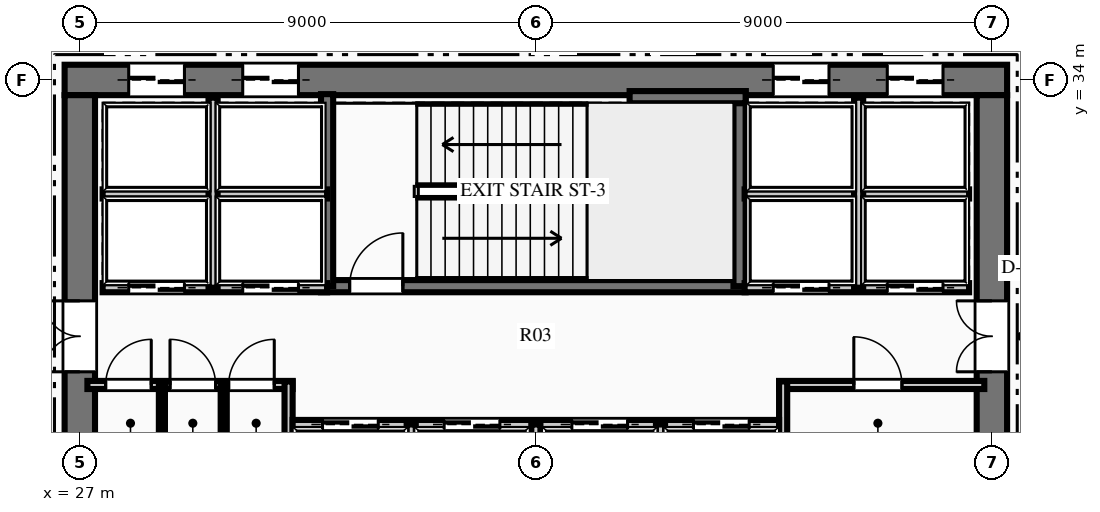
"""IFC4 building model, lengths in metres.
Left out: names, types, materials, properties, quantities, classifications, styles, units other than length and angle.
Written with IfcOpenShell. Run it as: python <this file> out.ifc"""

import sys

from ifc_helpers import new_model, si_unit, direction, frame, frame_2d, origin, place, context, subcontext, project, spatial, rectangle, extrude, element, fill, save


model = new_model("IFC4")
c1 = context("Model", 3, precision=1e-05, world=origin(), true_north=direction((0.0, 1.0)))
c2 = subcontext(c1, "Body", "Model", "MODEL_VIEW")
j1 = project(units=[si_unit("LENGTHUNIT", "METRE"), si_unit("PLANEANGLEUNIT", "RADIAN")], contexts=[c1])
p1 = place(None, origin())
s1 = spatial("IfcSite", under=j1, at=p1, CompositionType="ELEMENT")
p2 = place(p1, origin())
s2 = spatial("IfcBuilding", under=s1, at=p2, CompositionType="ELEMENT")
p3 = place(p2, frame((0.0, 0.0, 28.2)))
s3 = spatial("IfcBuildingStorey", under=s2, at=p3, CompositionType="ELEMENT", Elevation=28.2)
p4 = place(p3, frame((26.7, 34.0, 0.0), z_axis=(0.0, 0.0, 1.0), x_axis=(1.0, 0.0, 0.0)))
e1 = element("IfcWall", 1, at=p4, inside=s3, PredefinedType="SHEAR", context=c2, shape_type="SweptSolid", body=[
    extrude(rectangle(XDim=18.6, YDim=0.6, at=frame_2d((9.3, 0.0))), origin(), (0.0, 0.0, 1.0), 4.5),
])
p5 = place(p4, frame((1.265, 0.0, 0.0)))
e2 = element("IfcOpeningElement", 2, at=p5, cuts=e1, PredefinedType="OPENING", context=c2, shape_type="SweptSolid", body=[
    extrude(rectangle(XDim=1.1, YDim=2.15, at=frame_2d((0.55, 1.075))), frame((0.0, 0.31, 0.0), z_axis=(0.0, -1.0, 0.0), x_axis=(1.0, 0.0, 0.0)), (0.0, 0.0, 1.0), 0.62),
])
p6 = place(p4, frame((3.515, 0.0, 0.0)))
e3 = element("IfcOpeningElement", 3, at=p6, cuts=e1, PredefinedType="OPENING", context=c2, shape_type="SweptSolid", body=[
    extrude(rectangle(XDim=1.1, YDim=2.15, at=frame_2d((0.55, 1.075))), frame((0.0, 0.31, 0.0), z_axis=(0.0, -1.0, 0.0), x_axis=(1.0, 0.0, 0.0)), (0.0, 0.0, 1.0), 0.62),
])
p7 = place(p4, frame((13.985, 0.0, 0.0)))
e4 = element("IfcOpeningElement", 4, at=p7, cuts=e1, PredefinedType="OPENING", context=c2, shape_type="SweptSolid", body=[
    extrude(rectangle(XDim=1.1, YDim=2.15, at=frame_2d((0.55, 1.075))), frame((0.0, 0.31, 0.0), z_axis=(0.0, -1.0, 0.0), x_axis=(1.0, 0.0, 0.0)), (0.0, 0.0, 1.0), 0.62),
])
p8 = place(p4, frame((16.235, 0.0, 0.0)))
e5 = element("IfcOpeningElement", 5, at=p8, cuts=e1, PredefinedType="OPENING", context=c2, shape_type="SweptSolid", body=[
    extrude(rectangle(XDim=1.1, YDim=2.15, at=frame_2d((0.55, 1.075))), frame((0.0, 0.31, 0.0), z_axis=(0.0, -1.0, 0.0), x_axis=(1.0, 0.0, 0.0)), (0.0, 0.0, 1.0), 0.62),
])
p9 = place(p3, frame((27.0, 18.3, 0.0), z_axis=(0.0, 0.0, 1.0), x_axis=(0.0, 1.0, 0.0)))
e6 = element("IfcWall", 6, at=p9, inside=s3, PredefinedType="SHEAR", context=c2, shape_type="SweptSolid", body=[
    extrude(rectangle(XDim=15.4, YDim=0.6, at=frame_2d((7.7, 0.0))), origin(), (0.0, 0.0, 1.0), 4.5),
])
p10 = place(p9, frame((9.94, 0.0, 0.0)))
e7 = element("IfcOpeningElement", 7, at=p10, cuts=e6, PredefinedType="OPENING", context=c2, shape_type="SweptSolid", body=[
    extrude(rectangle(XDim=1.4, YDim=2.2, at=frame_2d((0.7, 1.1))), frame((0.0, 0.31, 0.0), z_axis=(0.0, -1.0, 0.0), x_axis=(1.0, 0.0, 0.0)), (0.0, 0.0, 1.0), 0.62),
])
p11 = place(p3, frame((45.0, 18.3, 0.0), z_axis=(0.0, 0.0, 1.0), x_axis=(0.0, 1.0, 0.0)))
e8 = element("IfcWall", 8, at=p11, inside=s3, PredefinedType="SHEAR", context=c2, shape_type="SweptSolid", body=[
    extrude(rectangle(XDim=15.4, YDim=0.6, at=frame_2d((7.7, 0.0))), origin(), (0.0, 0.0, 1.0), 4.5),
])
p12 = place(p11, frame((9.94, 0.0, 0.0)))
e9 = element("IfcOpeningElement", 9, at=p12, cuts=e8, PredefinedType="OPENING", context=c2, shape_type="SweptSolid", body=[
    extrude(rectangle(XDim=1.4, YDim=2.2, at=frame_2d((0.7, 1.1))), frame((0.0, 0.31, 0.0), z_axis=(0.0, -1.0, 0.0), x_axis=(1.0, 0.0, 0.0)), (0.0, 0.0, 1.0), 0.62),
])
p13 = place(p3, frame((31.76, 29.93, 0.0), z_axis=(0.0, 0.0, 1.0), x_axis=(1.0, 0.0, 0.0)))
e10 = element("IfcWall", 10, at=p13, inside=s3, PredefinedType="SHEAR", context=c2, shape_type="SweptSolid", body=[
    extrude(rectangle(XDim=8.38, YDim=0.24, at=frame_2d((4.19, 0.0))), origin(), (0.0, 0.0, 1.0), 4.5),
])
p14 = place(p13, frame((0.565, 0.0, 0.0)))
e11 = element("IfcOpeningElement", 11, at=p14, cuts=e10, PredefinedType="OPENING", context=c2, shape_type="SweptSolid", body=[
    extrude(rectangle(XDim=1.05, YDim=2.15, at=frame_2d((0.525, 1.075))), frame((0.0, 0.13, 0.0), z_axis=(0.0, -1.0, 0.0), x_axis=(1.0, 0.0, 0.0)), (0.0, 0.0, 1.0), 0.26),
])
p15 = place(p3, frame((31.88, 29.93, 0.0), z_axis=(0.0, 0.0, 1.0), x_axis=(0.0, 1.0, 0.0)))
e12 = element("IfcWall", 12, at=p15, inside=s3, PredefinedType="SHEAR", context=c2, shape_type="SweptSolid", body=[
    extrude(rectangle(XDim=3.79, YDim=0.24, at=frame_2d((1.895, 0.0))), origin(), (0.0, 0.0, 1.0), 4.5),
])
p16 = place(p3, frame((40.02, 29.93, 0.0), z_axis=(0.0, 0.0, 1.0), x_axis=(0.0, 1.0, 0.0)))
e13 = element("IfcWall", 13, at=p16, inside=s3, PredefinedType="SHEAR", context=c2, shape_type="SweptSolid", body=[
    extrude(rectangle(XDim=3.85, YDim=0.24, at=frame_2d((1.925, 0.0))), origin(), (0.0, 0.0, 1.0), 4.5),
])
p17 = place(p3, frame((37.85, 33.66, 0.0), z_axis=(0.0, 0.0, 1.0), x_axis=(1.0, 0.0, 0.0)))
e14 = element("IfcWall", 14, at=p17, inside=s3, PredefinedType="SHEAR", context=c2, shape_type="SweptSolid", body=[
    extrude(rectangle(XDim=2.29, YDim=0.24, at=frame_2d((1.145, 0.0))), origin(), (0.0, 0.0, 1.0), 4.5),
])
p18 = place(p3, frame((27.15, 27.98, 0.0), z_axis=(0.0, 0.0, 1.0), x_axis=(1.0, 0.0, 0.0)))
e15 = element("IfcWall", 15, at=p18, inside=s3, PredefinedType="PARTITIONING", context=c2, shape_type="SweptSolid", body=[
    extrude(rectangle(XDim=4.05, YDim=0.16, at=frame_2d((2.025, 0.0))), origin(), (0.0, 0.0, 1.0), 4.19),
])
p19 = place(p18, frame((0.36, 0.0, 0.0)))
e16 = element("IfcOpeningElement", 16, at=p19, cuts=e15, PredefinedType="OPENING", context=c2, shape_type="SweptSolid", body=[
    extrude(rectangle(XDim=0.9, YDim=2.15, at=frame_2d((0.45, 1.075))), frame((0.0, 0.09, 0.0), z_axis=(0.0, -1.0, 0.0), x_axis=(1.0, 0.0, 0.0)), (0.0, 0.0, 1.0), 0.18),
])
p20 = place(p18, frame((1.63, 0.0, 0.0)))
e17 = element("IfcOpeningElement", 17, at=p20, cuts=e15, PredefinedType="OPENING", context=c2, shape_type="SweptSolid", body=[
    extrude(rectangle(XDim=0.9, YDim=2.15, at=frame_2d((0.45, 1.075))), frame((0.0, 0.09, 0.0), z_axis=(0.0, -1.0, 0.0), x_axis=(1.0, 0.0, 0.0)), (0.0, 0.0, 1.0), 0.18),
])
p21 = place(p18, frame((2.788, 0.0, 0.0)))
e18 = element("IfcOpeningElement", 18, at=p21, cuts=e15, PredefinedType="OPENING", context=c2, shape_type="SweptSolid", body=[
    extrude(rectangle(XDim=0.9, YDim=2.15, at=frame_2d((0.45, 1.075))), frame((0.0, 0.09, 0.0), z_axis=(0.0, -1.0, 0.0), x_axis=(1.0, 0.0, 0.0)), (0.0, 0.0, 1.0), 0.18),
])
p22 = place(p3, frame((31.12, 26.54, 0.0), z_axis=(0.0, 0.0, 1.0), x_axis=(0.0, 1.0, 0.0)))
e19 = element("IfcWall", 19, at=p22, inside=s3, PredefinedType="PARTITIONING", context=c2, shape_type="SweptSolid", body=[
    extrude(rectangle(XDim=1.51, YDim=0.16, at=frame_2d((0.755, 0.0))), origin(), (0.0, 0.0, 1.0), 4.19),
])
p23 = place(p3, frame((40.8, 27.98, 0.0), z_axis=(0.0, 0.0, 1.0), x_axis=(1.0, 0.0, 0.0)))
e20 = element("IfcWall", 20, at=p23, inside=s3, PredefinedType="PARTITIONING", context=c2, shape_type="SweptSolid", body=[
    extrude(rectangle(XDim=4.05, YDim=0.16, at=frame_2d((2.025, 0.0))), origin(), (0.0, 0.0, 1.0), 4.19),
])
p24 = place(p23, frame((1.475, 0.0, 0.0)))
e21 = element("IfcOpeningElement", 21, at=p24, cuts=e20, PredefinedType="OPENING", context=c2, shape_type="SweptSolid", body=[
    extrude(rectangle(XDim=0.95, YDim=2.15, at=frame_2d((0.475, 1.075))), frame((0.0, 0.09, 0.0), z_axis=(0.0, -1.0, 0.0), x_axis=(1.0, 0.0, 0.0)), (0.0, 0.0, 1.0), 0.18),
])
p25 = place(p3, frame((40.88, 26.54, 0.0), z_axis=(0.0, 0.0, 1.0), x_axis=(0.0, 1.0, 0.0)))
e22 = element("IfcWall", 22, at=p25, inside=s3, PredefinedType="PARTITIONING", context=c2, shape_type="SweptSolid", body=[
    extrude(rectangle(XDim=1.51, YDim=0.16, at=frame_2d((0.755, 0.0))), origin(), (0.0, 0.0, 1.0), 4.19),
])
for number, where, z_axis, x_axis in (
    (23, (28.62, 26.54, 0.0), (0.0, 0.0, 1.0), (0.0, 1.0, 0.0)),
    (24, (29.84, 26.54, 0.0), (0.0, 0.0, 1.0), (0.0, 1.0, 0.0)),
):
    element("IfcWall", number, at=place(p3, frame(where, z_axis=z_axis, x_axis=x_axis)), inside=s3, PredefinedType="PARTITIONING", context=c2, shape_type="SweptSolid", body=[
        extrude(rectangle(XDim=1.44, YDim=0.12, at=frame_2d((0.72, 0.0))), origin(), (0.0, 0.0, 1.0), 4.19),
    ])
p26 = place(p3, frame((27.45, 29.9, 0.0), z_axis=(0.0, 0.0, 1.0), x_axis=(1.0, 0.0, 0.0)))
e25 = element("IfcWall", 25, at=p26, inside=s3, PredefinedType="PARTITIONING", context=c2, shape_type="SweptSolid", body=[
    extrude(rectangle(XDim=4.43, YDim=0.18, at=frame_2d((2.215, 0.0))), origin(), (0.0, 0.0, 1.0), 4.19),
])
p27 = place(p26, frame((0.515, 0.0, 0.0)))
e26 = element("IfcOpeningElement", 26, at=p27, cuts=e25, PredefinedType="OPENING", context=c2, shape_type="SweptSolid", body=[
    extrude(rectangle(XDim=1.1, YDim=2.15, at=frame_2d((0.55, 1.075))), frame((0.0, 0.1, 0.0), z_axis=(0.0, -1.0, 0.0), x_axis=(1.0, 0.0, 0.0)), (0.0, 0.0, 1.0), 0.2),
])
p28 = place(p26, frame((2.765, 0.0, 0.0)))
e27 = element("IfcOpeningElement", 27, at=p28, cuts=e25, PredefinedType="OPENING", context=c2, shape_type="SweptSolid", body=[
    extrude(rectangle(XDim=1.1, YDim=2.15, at=frame_2d((0.55, 1.075))), frame((0.0, 0.1, 0.0), z_axis=(0.0, -1.0, 0.0), x_axis=(1.0, 0.0, 0.0)), (0.0, 0.0, 1.0), 0.2),
])
p29 = place(p3, frame((27.45, 31.75, 0.0), z_axis=(0.0, 0.0, 1.0), x_axis=(1.0, 0.0, 0.0)))
e28 = element("IfcWall", 28, at=p29, inside=s3, PredefinedType="PARTITIONING", context=c2, shape_type="SweptSolid", body=[
    extrude(rectangle(XDim=4.43, YDim=0.18, at=frame_2d((2.215, 0.0))), origin(), (0.0, 0.0, 1.0), 4.19),
])
p30 = place(p3, frame((29.63, 29.9, 0.0), z_axis=(0.0, 0.0, 1.0), x_axis=(0.0, 1.0, 0.0)))
e29 = element("IfcWall", 29, at=p30, inside=s3, PredefinedType="PARTITIONING", context=c2, shape_type="SweptSolid", body=[
    extrude(rectangle(XDim=3.75, YDim=0.18, at=frame_2d((1.875, 0.0))), origin(), (0.0, 0.0, 1.0), 4.19),
])
p31 = place(p3, frame((40.12, 29.9, 0.0), z_axis=(0.0, 0.0, 1.0), x_axis=(1.0, 0.0, 0.0)))
e30 = element("IfcWall", 30, at=p31, inside=s3, PredefinedType="PARTITIONING", context=c2, shape_type="SweptSolid", body=[
    extrude(rectangle(XDim=4.43, YDim=0.18, at=frame_2d((2.215, 0.0))), origin(), (0.0, 0.0, 1.0), 4.19),
])
p32 = place(p31, frame((0.565, 0.0, 0.0)))
e31 = element("IfcOpeningElement", 31, at=p32, cuts=e30, PredefinedType="OPENING", context=c2, shape_type="SweptSolid", body=[
    extrude(rectangle(XDim=1.1, YDim=2.15, at=frame_2d((0.55, 1.075))), frame((0.0, 0.1, 0.0), z_axis=(0.0, -1.0, 0.0), x_axis=(1.0, 0.0, 0.0)), (0.0, 0.0, 1.0), 0.2),
])
p33 = place(p31, frame((2.815, 0.0, 0.0)))
e32 = element("IfcOpeningElement", 32, at=p33, cuts=e30, PredefinedType="OPENING", context=c2, shape_type="SweptSolid", body=[
    extrude(rectangle(XDim=1.1, YDim=2.15, at=frame_2d((0.55, 1.075))), frame((0.0, 0.1, 0.0), z_axis=(0.0, -1.0, 0.0), x_axis=(1.0, 0.0, 0.0)), (0.0, 0.0, 1.0), 0.2),
])
p34 = place(p3, frame((40.12, 31.75, 0.0), z_axis=(0.0, 0.0, 1.0), x_axis=(1.0, 0.0, 0.0)))
e33 = element("IfcWall", 33, at=p34, inside=s3, PredefinedType="PARTITIONING", context=c2, shape_type="SweptSolid", body=[
    extrude(rectangle(XDim=4.43, YDim=0.18, at=frame_2d((2.215, 0.0))), origin(), (0.0, 0.0, 1.0), 4.19),
])
p35 = place(p3, frame((42.37, 29.9, 0.0), z_axis=(0.0, 0.0, 1.0), x_axis=(0.0, 1.0, 0.0)))
e34 = element("IfcWall", 34, at=p35, inside=s3, PredefinedType="PARTITIONING", context=c2, shape_type="SweptSolid", body=[
    extrude(rectangle(XDim=3.75, YDim=0.18, at=frame_2d((1.875, 0.0))), origin(), (0.0, 0.0, 1.0), 4.19),
])
p36 = place(p3, frame((31.2, 27.2, 0.0), z_axis=(0.0, 0.0, 1.0), x_axis=(1.0, 0.0, 0.0)))
e35 = element("IfcWall", 35, at=p36, inside=s3, PredefinedType="PARTITIONING", context=c2, shape_type="SweptSolid", body=[
    extrude(rectangle(XDim=9.6, YDim=0.18, at=frame_2d((4.8, 0.0))), origin(), (0.0, 0.0, 1.0), 4.19),
])
p37 = place(p36, frame((0.59, 0.0, 0.0)))
e36 = element("IfcOpeningElement", 36, at=p37, cuts=e35, PredefinedType="OPENING", context=c2, shape_type="SweptSolid", body=[
    extrude(rectangle(XDim=1.1, YDim=2.15, at=frame_2d((0.55, 1.075))), frame((0.0, 0.1, 0.0), z_axis=(0.0, -1.0, 0.0), x_axis=(1.0, 0.0, 0.0)), (0.0, 0.0, 1.0), 0.2),
])
p38 = place(p36, frame((2.99, 0.0, 0.0)))
e37 = element("IfcOpeningElement", 37, at=p38, cuts=e35, PredefinedType="OPENING", context=c2, shape_type="SweptSolid", body=[
    extrude(rectangle(XDim=1.1, YDim=2.15, at=frame_2d((0.55, 1.075))), frame((0.0, 0.1, 0.0), z_axis=(0.0, -1.0, 0.0), x_axis=(1.0, 0.0, 0.0)), (0.0, 0.0, 1.0), 0.2),
])
p39 = place(p36, frame((5.51, 0.0, 0.0)))
e38 = element("IfcOpeningElement", 38, at=p39, cuts=e35, PredefinedType="OPENING", context=c2, shape_type="SweptSolid", body=[
    extrude(rectangle(XDim=1.1, YDim=2.15, at=frame_2d((0.55, 1.075))), frame((0.0, 0.1, 0.0), z_axis=(0.0, -1.0, 0.0), x_axis=(1.0, 0.0, 0.0)), (0.0, 0.0, 1.0), 0.2),
])
p40 = place(p36, frame((7.91, 0.0, 0.0)))
e39 = element("IfcOpeningElement", 39, at=p40, cuts=e35, PredefinedType="OPENING", context=c2, shape_type="SweptSolid", body=[
    extrude(rectangle(XDim=1.1, YDim=2.15, at=frame_2d((0.55, 1.075))), frame((0.0, 0.1, 0.0), z_axis=(0.0, -1.0, 0.0), x_axis=(1.0, 0.0, 0.0)), (0.0, 0.0, 1.0), 0.2),
])
for number, where, z_axis, x_axis in (
    (40, (33.54, 25.3, 0.0), (0.0, 0.0, 1.0), (0.0, 1.0, 0.0)),
    (41, (36.0, 25.3, 0.0), (0.0, 0.0, 1.0), (0.0, 1.0, 0.0)),
    (42, (38.46, 25.3, 0.0), (0.0, 0.0, 1.0), (0.0, 1.0, 0.0)),
):
    element("IfcWall", number, at=place(p3, frame(where, z_axis=z_axis, x_axis=x_axis)), inside=s3, PredefinedType="PARTITIONING", context=c2, shape_type="SweptSolid", body=[
        extrude(rectangle(XDim=1.9, YDim=0.18, at=frame_2d((0.95, 0.0))), origin(), (0.0, 0.0, 1.0), 4.19),
    ])
p41 = place(p19, origin())
e43 = element("IfcDoor", 43, at=p41, inside=s3, OperationType="SINGLE_SWING_RIGHT", PredefinedType="DOOR", context=c2, shape_type="SweptSolid", body=[
    extrude(rectangle(XDim=0.9, YDim=2.15, at=frame_2d((0.45, 1.075))), frame((0.0, 0.025, 0.0), z_axis=(0.0, -1.0, 0.0), x_axis=(1.0, 0.0, 0.0)), (0.0, 0.0, 1.0), 0.05),
])
fill(e16, e43)
p42 = place(p20, origin())
e44 = element("IfcDoor", 44, at=p42, inside=s3, OperationType="SINGLE_SWING_LEFT", PredefinedType="DOOR", context=c2, shape_type="SweptSolid", body=[
    extrude(rectangle(XDim=0.9, YDim=2.15, at=frame_2d((0.45, 1.075))), frame((0.0, 0.025, 0.0), z_axis=(0.0, -1.0, 0.0), x_axis=(1.0, 0.0, 0.0)), (0.0, 0.0, 1.0), 0.05),
])
fill(e17, e44)
p43 = place(p21, origin())
e45 = element("IfcDoor", 45, at=p43, inside=s3, OperationType="SINGLE_SWING_RIGHT", PredefinedType="DOOR", context=c2, shape_type="SweptSolid", body=[
    extrude(rectangle(XDim=0.9, YDim=2.15, at=frame_2d((0.45, 1.075))), frame((0.0, 0.025, 0.0), z_axis=(0.0, -1.0, 0.0), x_axis=(1.0, 0.0, 0.0)), (0.0, 0.0, 1.0), 0.05),
])
fill(e18, e45)
p44 = place(p24, origin())
e46 = element("IfcDoor", 46, at=p44, inside=s3, OperationType="SINGLE_SWING_LEFT", PredefinedType="DOOR", context=c2, shape_type="SweptSolid", body=[
    extrude(rectangle(XDim=0.95, YDim=2.15, at=frame_2d((0.475, 1.075))), frame((0.0, 0.025, 0.0), z_axis=(0.0, -1.0, 0.0), x_axis=(1.0, 0.0, 0.0)), (0.0, 0.0, 1.0), 0.05),
])
fill(e21, e46)
p45 = place(p14, origin())
e47 = element("IfcDoor", 47, at=p45, inside=s3, OperationType="SINGLE_SWING_RIGHT", PredefinedType="DOOR", context=c2, shape_type="SweptSolid", body=[
    extrude(rectangle(XDim=1.05, YDim=2.15, at=frame_2d((0.525, 1.075))), frame((0.0, 0.025, 0.0), z_axis=(0.0, -1.0, 0.0), x_axis=(1.0, 0.0, 0.0)), (0.0, 0.0, 1.0), 0.05),
])
fill(e11, e47)
p46 = place(p10, origin())
e48 = element("IfcDoor", 48, at=p46, inside=s3, OperationType="DOUBLE_DOOR_SINGLE_SWING", PredefinedType="DOOR", context=c2, shape_type="SweptSolid", body=[
    extrude(rectangle(XDim=1.4, YDim=2.2, at=frame_2d((0.7, 1.1))), frame((0.0, 0.025, 0.0), z_axis=(0.0, -1.0, 0.0), x_axis=(1.0, 0.0, 0.0)), (0.0, 0.0, 1.0), 0.05),
])
fill(e7, e48)
p47 = place(p12, origin())
e49 = element("IfcDoor", 49, at=p47, inside=s3, OperationType="DOUBLE_DOOR_SINGLE_SWING", PredefinedType="DOOR", context=c2, shape_type="SweptSolid", body=[
    extrude(rectangle(XDim=1.4, YDim=2.2, at=frame_2d((0.7, 1.1))), frame((0.0, 0.025, 0.0), z_axis=(0.0, -1.0, 0.0), x_axis=(1.0, 0.0, 0.0)), (0.0, 0.0, 1.0), 0.05),
])
fill(e9, e49)
p48 = place(p27, origin())
e50 = element("IfcDoor", 50, at=p48, inside=s3, OperationType="SLIDING_TO_LEFT", PredefinedType="DOOR", context=c2, shape_type="SweptSolid", body=[
    extrude(rectangle(XDim=1.1, YDim=2.15, at=frame_2d((0.55, 1.075))), frame((0.0, 0.025, 0.0), z_axis=(0.0, -1.0, 0.0), x_axis=(1.0, 0.0, 0.0)), (0.0, 0.0, 1.0), 0.05),
])
fill(e26, e50)
p49 = place(p28, origin())
e51 = element("IfcDoor", 51, at=p49, inside=s3, OperationType="SLIDING_TO_LEFT", PredefinedType="DOOR", context=c2, shape_type="SweptSolid", body=[
    extrude(rectangle(XDim=1.1, YDim=2.15, at=frame_2d((0.55, 1.075))), frame((0.0, 0.025, 0.0), z_axis=(0.0, -1.0, 0.0), x_axis=(1.0, 0.0, 0.0)), (0.0, 0.0, 1.0), 0.05),
])
fill(e27, e51)
p50 = place(p5, origin())
e52 = element("IfcDoor", 52, at=p50, inside=s3, OperationType="SLIDING_TO_LEFT", PredefinedType="DOOR", context=c2, shape_type="SweptSolid", body=[
    extrude(rectangle(XDim=1.1, YDim=2.15, at=frame_2d((0.55, 1.075))), frame((0.0, 0.025, 0.0), z_axis=(0.0, -1.0, 0.0), x_axis=(1.0, 0.0, 0.0)), (0.0, 0.0, 1.0), 0.05),
])
fill(e2, e52)
p51 = place(p6, origin())
e53 = element("IfcDoor", 53, at=p51, inside=s3, OperationType="SLIDING_TO_LEFT", PredefinedType="DOOR", context=c2, shape_type="SweptSolid", body=[
    extrude(rectangle(XDim=1.1, YDim=2.15, at=frame_2d((0.55, 1.075))), frame((0.0, 0.025, 0.0), z_axis=(0.0, -1.0, 0.0), x_axis=(1.0, 0.0, 0.0)), (0.0, 0.0, 1.0), 0.05),
])
fill(e3, e53)
p52 = place(p32, origin())
e54 = element("IfcDoor", 54, at=p52, inside=s3, OperationType="SLIDING_TO_LEFT", PredefinedType="DOOR", context=c2, shape_type="SweptSolid", body=[
    extrude(rectangle(XDim=1.1, YDim=2.15, at=frame_2d((0.55, 1.075))), frame((0.0, 0.025, 0.0), z_axis=(0.0, -1.0, 0.0), x_axis=(1.0, 0.0, 0.0)), (0.0, 0.0, 1.0), 0.05),
])
fill(e31, e54)
p53 = place(p33, origin())
e55 = element("IfcDoor", 55, at=p53, inside=s3, OperationType="SLIDING_TO_LEFT", PredefinedType="DOOR", context=c2, shape_type="SweptSolid", body=[
    extrude(rectangle(XDim=1.1, YDim=2.15, at=frame_2d((0.55, 1.075))), frame((0.0, 0.025, 0.0), z_axis=(0.0, -1.0, 0.0), x_axis=(1.0, 0.0, 0.0)), (0.0, 0.0, 1.0), 0.05),
])
fill(e32, e55)
p54 = place(p7, origin())
e56 = element("IfcDoor", 56, at=p54, inside=s3, OperationType="SLIDING_TO_LEFT", PredefinedType="DOOR", context=c2, shape_type="SweptSolid", body=[
    extrude(rectangle(XDim=1.1, YDim=2.15, at=frame_2d((0.55, 1.075))), frame((0.0, 0.025, 0.0), z_axis=(0.0, -1.0, 0.0), x_axis=(1.0, 0.0, 0.0)), (0.0, 0.0, 1.0), 0.05),
])
fill(e4, e56)
p55 = place(p8, origin())
e57 = element("IfcDoor", 57, at=p55, inside=s3, OperationType="SLIDING_TO_LEFT", PredefinedType="DOOR", context=c2, shape_type="SweptSolid", body=[
    extrude(rectangle(XDim=1.1, YDim=2.15, at=frame_2d((0.55, 1.075))), frame((0.0, 0.025, 0.0), z_axis=(0.0, -1.0, 0.0), x_axis=(1.0, 0.0, 0.0)), (0.0, 0.0, 1.0), 0.05),
])
fill(e5, e57)
p56 = place(p37, origin())
e58 = element("IfcDoor", 58, at=p56, inside=s3, OperationType="SLIDING_TO_LEFT", PredefinedType="DOOR", context=c2, shape_type="SweptSolid", body=[
    extrude(rectangle(XDim=1.1, YDim=2.15, at=frame_2d((0.55, 1.075))), frame((0.0, 0.025, 0.0), z_axis=(0.0, -1.0, 0.0), x_axis=(1.0, 0.0, 0.0)), (0.0, 0.0, 1.0), 0.05),
])
fill(e36, e58)
p57 = place(p38, origin())
e59 = element("IfcDoor", 59, at=p57, inside=s3, OperationType="SLIDING_TO_LEFT", PredefinedType="DOOR", context=c2, shape_type="SweptSolid", body=[
    extrude(rectangle(XDim=1.1, YDim=2.15, at=frame_2d((0.55, 1.075))), frame((0.0, 0.025, 0.0), z_axis=(0.0, -1.0, 0.0), x_axis=(1.0, 0.0, 0.0)), (0.0, 0.0, 1.0), 0.05),
])
fill(e37, e59)
p58 = place(p39, origin())
e60 = element("IfcDoor", 60, at=p58, inside=s3, OperationType="SLIDING_TO_LEFT", PredefinedType="DOOR", context=c2, shape_type="SweptSolid", body=[
    extrude(rectangle(XDim=1.1, YDim=2.15, at=frame_2d((0.55, 1.075))), frame((0.0, 0.025, 0.0), z_axis=(0.0, -1.0, 0.0), x_axis=(1.0, 0.0, 0.0)), (0.0, 0.0, 1.0), 0.05),
])
fill(e38, e60)
p59 = place(p40, origin())
e61 = element("IfcDoor", 61, at=p59, inside=s3, OperationType="SLIDING_TO_LEFT", PredefinedType="DOOR", context=c2, shape_type="SweptSolid", body=[
    extrude(rectangle(XDim=1.1, YDim=2.15, at=frame_2d((0.55, 1.075))), frame((0.0, 0.025, 0.0), z_axis=(0.0, -1.0, 0.0), x_axis=(1.0, 0.0, 0.0)), (0.0, 0.0, 1.0), 0.05),
])
fill(e39, e61)
save(model, sys.argv[1])
